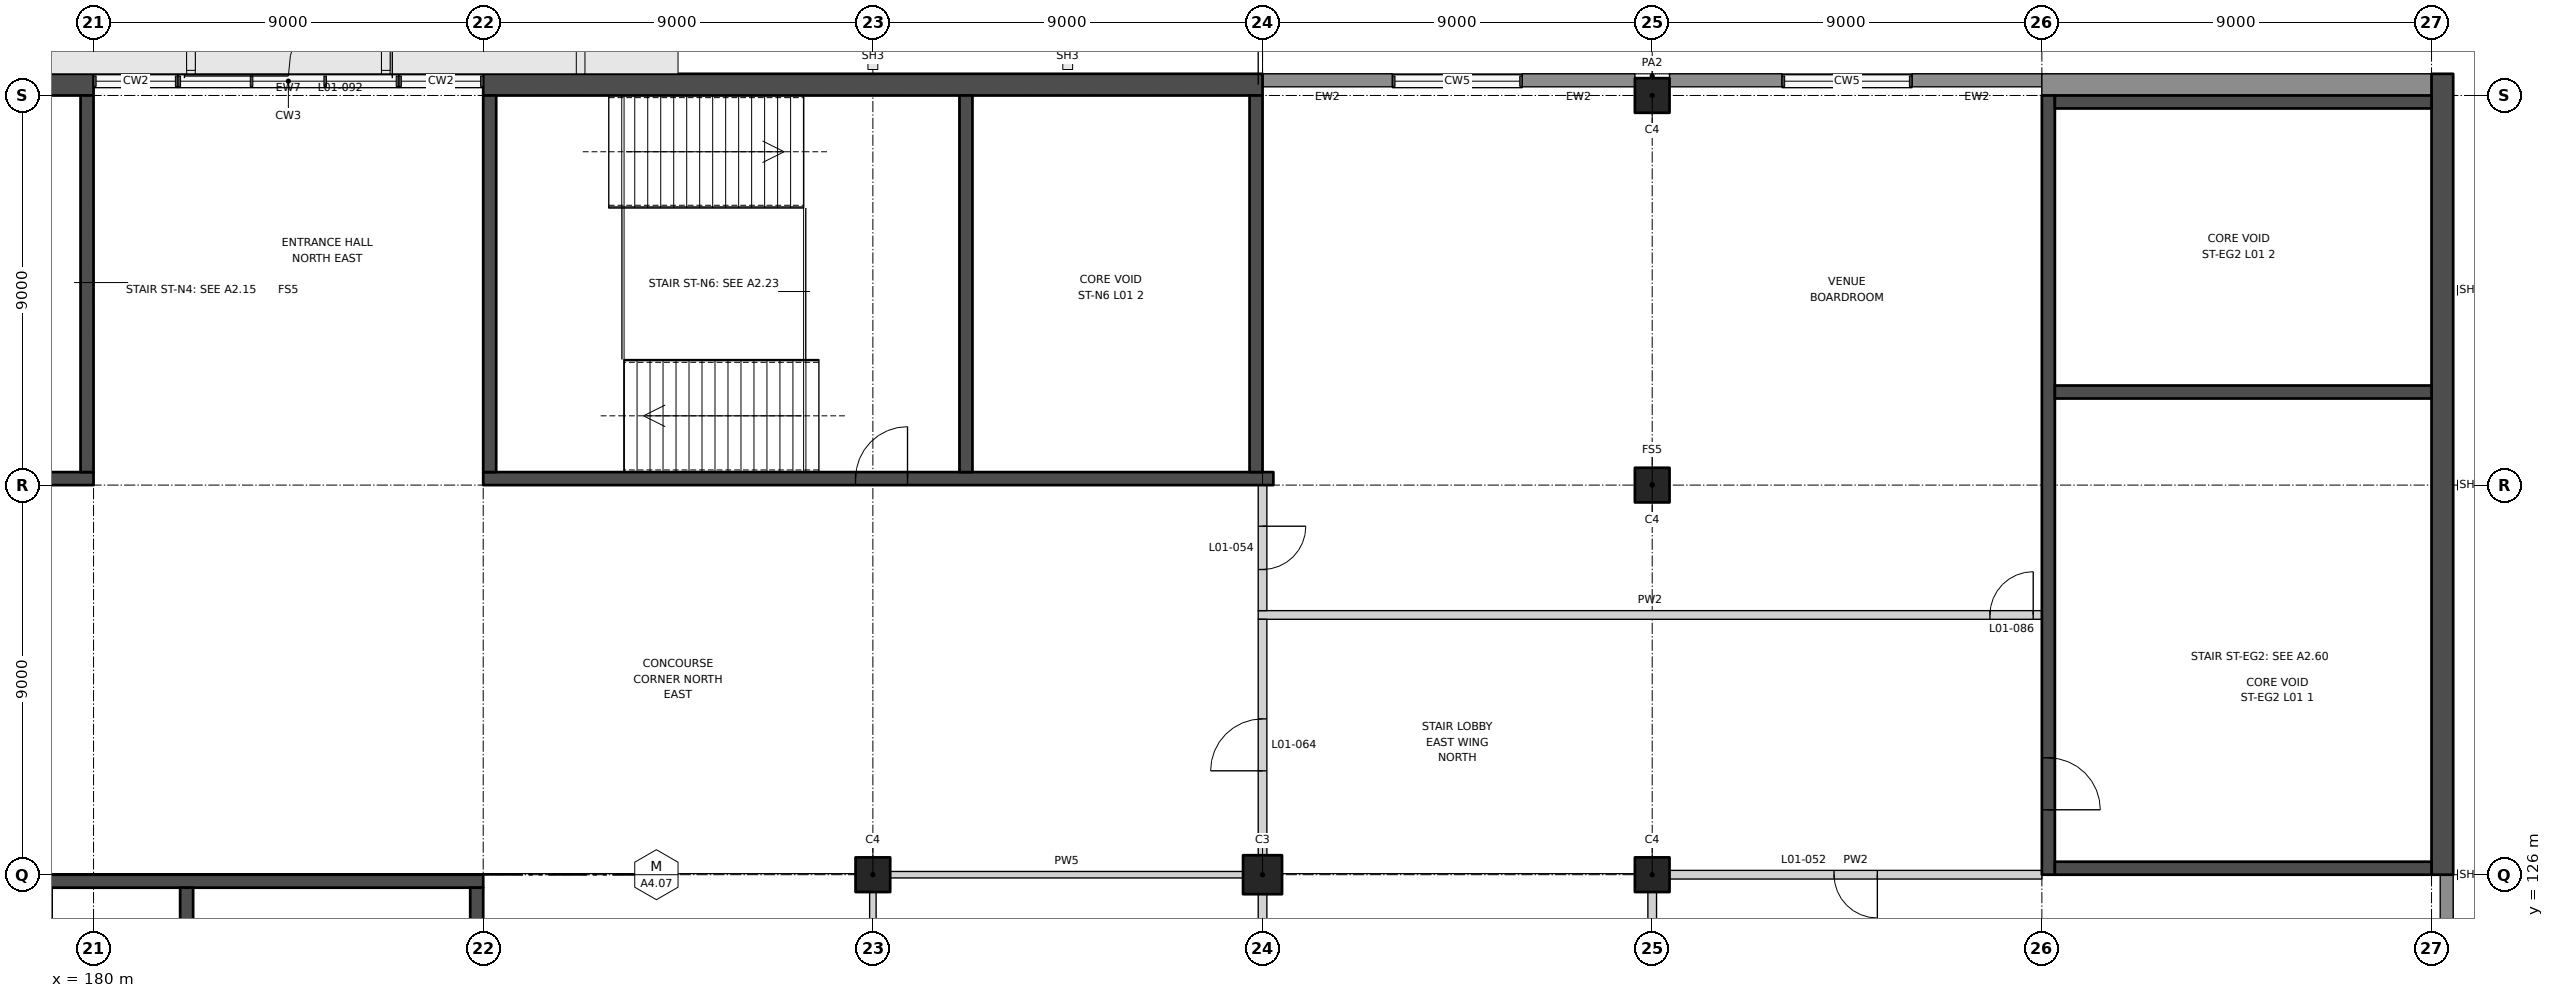
"""IFC4 building model, lengths in metres.
Left out: names, types, materials, properties, quantities, classifications, styles, units other than length and angle.
Written with IfcOpenShell. Run it as: python <this file> out.ifc"""

import sys

from ifc_helpers import new_model, si_unit, direction, frame, frame_2d, origin, origin_2d, place, context, subcontext, project, spatial, rectangle, extrude, element, fill, save


model = new_model("IFC4")
c1 = context("Model", 3, precision=1e-05, world=origin(), true_north=direction((0.0, 1.0)))
c2 = subcontext(c1, "Body", "Model", "MODEL_VIEW")
j1 = project(units=[si_unit("LENGTHUNIT", "METRE"), si_unit("PLANEANGLEUNIT", "RADIAN")], contexts=[c1])
p1 = place(None, origin())
s1 = spatial("IfcSite", under=j1, at=p1, CompositionType="ELEMENT")
p2 = place(p1, origin())
s2 = spatial("IfcBuilding", under=s1, at=p2, CompositionType="ELEMENT")
p3 = place(p2, frame((0.0, 0.0, 7.0)))
s3 = spatial("IfcBuildingStorey", under=s2, at=p3, CompositionType="ELEMENT", Elevation=7.0)
p4 = place(p3, frame((207.0, 126.0, 0.0), z_axis=(0.0, 0.0, 1.0), x_axis=(1.0, 0.0, 0.0)))
e1 = element("IfcColumn", 1, at=p4, inside=s3, PredefinedType="COLUMN", context=c2, shape_type="SweptSolid", body=[
    extrude(rectangle(XDim=0.9, YDim=0.9, at=origin_2d()), origin(), (0.0, 0.0, 1.0), 4.5),
])
for number, where, z_axis, x_axis in (
    (2, (198.0, 126.0, 0.0), (0.0, 0.0, 1.0), (1.0, 0.0, 0.0)),
    (3, (216.0, 126.0, 0.0), (0.0, 0.0, 1.0), (1.0, 0.0, 0.0)),
    (4, (216.0, 135.0, 0.0), (0.0, 0.0, 1.0), (1.0, 0.0, 0.0)),
    (5, (216.0, 144.0, 0.0), (0.0, 0.0, 1.0), (1.0, 0.0, 0.0)),
):
    element("IfcColumn", number, at=place(p3, frame(where, z_axis=z_axis, x_axis=x_axis)), inside=s3, PredefinedType="COLUMN", context=c2, shape_type="SweptSolid", body=[
        extrude(rectangle(XDim=0.8, YDim=0.8, at=origin_2d()), origin(), (0.0, 0.0, 1.0), 4.5),
    ])
p5 = place(p3, frame((198.4, 126.0, 0.0), z_axis=(0.0, 0.0, 1.0), x_axis=(1.0, 0.0, 0.0)))
e6 = element("IfcWall", 6, at=p5, inside=s3, PredefinedType="PARTITIONING", context=c2, shape_type="SweptSolid", body=[
    extrude(rectangle(XDim=8.15, YDim=0.15, at=frame_2d((4.075, 0.0))), origin(), (0.0, 0.0, 1.0), 3.25),
])
p6 = place(p3, frame((216.4, 126.0, 0.0), z_axis=(0.0, 0.0, 1.0), x_axis=(1.0, 0.0, 0.0)))
e7 = element("IfcWall", 7, at=p6, inside=s3, PredefinedType="PARTITIONING", context=c2, shape_type="SweptSolid", body=[
    extrude(rectangle(XDim=8.6, YDim=0.2, at=frame_2d((4.3, 0.0))), origin(), (0.0, 0.0, 1.0), 3.25),
])
p7 = place(p6, frame((3.8, 0.0, 0.0)))
e8 = element("IfcOpeningElement", 8, at=p7, cuts=e7, PredefinedType="OPENING", context=c2, shape_type="SweptSolid", body=[
    extrude(rectangle(XDim=1.0, YDim=2.1, at=frame_2d((0.5, 1.05))), frame((0.0, 0.11, 0.0), z_axis=(0.0, -1.0, 0.0), x_axis=(1.0, 0.0, 0.0)), (0.0, 0.0, 1.0), 0.22),
])
p8 = place(p3, frame((206.9, 132.0, 0.0), z_axis=(0.0, 0.0, 1.0), x_axis=(1.0, 0.0, 0.0)))
e9 = element("IfcWall", 9, at=p8, inside=s3, PredefinedType="PARTITIONING", context=c2, shape_type="SweptSolid", body=[
    extrude(rectangle(XDim=18.1, YDim=0.2, at=frame_2d((9.05, 0.0))), origin(), (0.0, 0.0, 1.0), 4.5),
])
p9 = place(p8, frame((16.9, 0.0, 0.0)))
e10 = element("IfcOpeningElement", 10, at=p9, cuts=e9, PredefinedType="OPENING", context=c2, shape_type="SweptSolid", body=[
    extrude(rectangle(XDim=1.0, YDim=2.1, at=frame_2d((0.5, 1.05))), frame((0.0, 0.11, 0.0), z_axis=(0.0, -1.0, 0.0), x_axis=(1.0, 0.0, 0.0)), (0.0, 0.0, 1.0), 0.22),
])
p10 = place(p3, frame((198.0, 117.4, 0.0), z_axis=(0.0, 0.0, 1.0), x_axis=(0.0, 1.0, 0.0)))
e11 = element("IfcWall", 11, at=p10, inside=s3, PredefinedType="PARTITIONING", context=c2, shape_type="SweptSolid", body=[
    extrude(rectangle(XDim=8.2, YDim=0.15, at=frame_2d((4.1, 0.0))), origin(), (0.0, 0.0, 1.0), 3.25),
])
p11 = place(p10, frame((3.2, 0.0, 0.0)))
e12 = element("IfcOpeningElement", 12, at=p11, cuts=e11, PredefinedType="OPENING", context=c2, shape_type="SweptSolid", body=[
    extrude(rectangle(XDim=1.8, YDim=2.1, at=frame_2d((0.9, 1.05))), frame((0.0, 0.085, 0.0), z_axis=(0.0, -1.0, 0.0), x_axis=(1.0, 0.0, 0.0)), (0.0, 0.0, 1.0), 0.17),
])
p12 = place(p3, frame((207.0, 117.45, 0.0), z_axis=(0.0, 0.0, 1.0), x_axis=(0.0, 1.0, 0.0)))
e13 = element("IfcWall", 13, at=p12, inside=s3, PredefinedType="PARTITIONING", context=c2, shape_type="SweptSolid", body=[
    extrude(rectangle(XDim=8.1, YDim=0.2, at=frame_2d((4.05, 0.0))), origin(), (0.0, 0.0, 1.0), 3.25),
])
p13 = place(p3, frame((207.0, 126.45, 0.0), z_axis=(0.0, 0.0, 1.0), x_axis=(0.0, 1.0, 0.0)))
e14 = element("IfcWall", 14, at=p13, inside=s3, PredefinedType="PARTITIONING", context=c2, shape_type="SweptSolid", body=[
    extrude(rectangle(XDim=5.45, YDim=0.2, at=frame_2d((2.725, 0.0))), origin(), (0.0, 0.0, 1.0), 3.25),
])
p14 = place(p13, frame((1.95, 0.0, 0.0)))
e15 = element("IfcOpeningElement", 15, at=p14, cuts=e14, PredefinedType="OPENING", context=c2, shape_type="SweptSolid", body=[
    extrude(rectangle(XDim=1.2, YDim=2.1, at=frame_2d((0.6, 1.05))), frame((0.0, 0.11, 0.0), z_axis=(0.0, -1.0, 0.0), x_axis=(1.0, 0.0, 0.0)), (0.0, 0.0, 1.0), 0.22),
])
p15 = place(p3, frame((207.0, 132.1, 0.0), z_axis=(0.0, 0.0, 1.0), x_axis=(0.0, 1.0, 0.0)))
e16 = element("IfcWall", 16, at=p15, inside=s3, PredefinedType="PARTITIONING", context=c2, shape_type="SweptSolid", body=[
    extrude(rectangle(XDim=2.9, YDim=0.2, at=frame_2d((1.45, 0.0))), origin(), (0.0, 0.0, 1.0), 3.25),
])
p16 = place(p15, frame((0.95, 0.0, 0.0)))
e17 = element("IfcOpeningElement", 17, at=p16, cuts=e16, PredefinedType="OPENING", context=c2, shape_type="SweptSolid", body=[
    extrude(rectangle(XDim=1.0, YDim=2.1, at=frame_2d((0.5, 1.05))), frame((0.0, 0.11, 0.0), z_axis=(0.0, -1.0, 0.0), x_axis=(1.0, 0.0, 0.0)), (0.0, 0.0, 1.0), 0.22),
])
p17 = place(p3, frame((216.0, 117.4, 0.0), z_axis=(0.0, 0.0, 1.0), x_axis=(0.0, 1.0, 0.0)))
e18 = element("IfcWall", 18, at=p17, inside=s3, PredefinedType="PARTITIONING", context=c2, shape_type="SweptSolid", body=[
    extrude(rectangle(XDim=8.2, YDim=0.2, at=frame_2d((4.1, 0.0))), origin(), (0.0, 0.0, 1.0), 3.25),
])
p18 = place(p3, frame((234.35, 117.4, 0.0), z_axis=(0.0, 0.0, 1.0), x_axis=(0.0, 1.0, 0.0)))
e19 = element("IfcWall", 19, at=p18, inside=s3, PredefinedType="SOLIDWALL", context=c2, shape_type="SweptSolid", body=[
    extrude(rectangle(XDim=8.6, YDim=0.3, at=frame_2d((4.3, 0.0))), origin(), (0.0, 0.0, 1.0), 4.5),
])
p19 = place(p18, frame((2.85, 0.0, 0.9)))
e20 = element("IfcOpeningElement", 20, at=p19, cuts=e19, PredefinedType="OPENING", context=c2, shape_type="SweptSolid", body=[
    extrude(rectangle(XDim=1.0, YDim=2.1, at=frame_2d((0.5, 1.05))), frame((0.0, 0.16, 0.0), z_axis=(0.0, -1.0, 0.0), x_axis=(1.0, 0.0, 0.0)), (0.0, 0.0, 1.0), 0.32),
])
p20 = place(p18, frame((4.35, 0.0, 0.9)))
e21 = element("IfcOpeningElement", 21, at=p20, cuts=e19, PredefinedType="OPENING", context=c2, shape_type="SweptSolid", body=[
    extrude(rectangle(XDim=1.0, YDim=2.1, at=frame_2d((0.5, 1.05))), frame((0.0, 0.16, 0.0), z_axis=(0.0, -1.0, 0.0), x_axis=(1.0, 0.0, 0.0)), (0.0, 0.0, 1.0), 0.32),
])
p21 = place(p3, frame((187.05, 144.45, 0.0), z_axis=(0.0, 0.0, 1.0), x_axis=(-1.0, 0.0, 0.0)))
e22 = element("IfcWall", 22, at=p21, inside=s3, PredefinedType="SOLIDWALL", context=c2, shape_type="SweptSolid", body=[
    extrude(rectangle(XDim=5.1, YDim=0.1, at=frame_2d((2.55, 0.0))), origin(), (0.0, 0.0, 1.0), 3.1),
])
p22 = place(p21, frame((0.15, 0.0, 0.0)))
e23 = element("IfcOpeningElement", 23, at=p22, cuts=e22, PredefinedType="OPENING", context=c2, shape_type="SweptSolid", body=[
    extrude(rectangle(XDim=4.8, YDim=2.7, at=frame_2d((2.4, 1.35))), frame((0.0, 0.06, 0.0), z_axis=(0.0, -1.0, 0.0), x_axis=(1.0, 0.0, 0.0)), (0.0, 0.0, 1.0), 0.12),
])
p23 = place(p3, frame((210.0, 144.35, 0.0), z_axis=(0.0, 0.0, 1.0), x_axis=(-1.0, 0.0, 0.0)))
e24 = element("IfcWall", 24, at=p23, inside=s3, PredefinedType="SOLIDWALL", context=c2, shape_type="SweptSolid", body=[
    extrude(rectangle(XDim=3.0, YDim=0.3, at=frame_2d((1.5, 0.0))), origin(), (0.0, 0.0, 1.0), 3.9),
])
for number, where, z_axis, x_axis in (
    (25, (215.6, 144.35, 0.0), (0.0, 0.0, 1.0), (-1.0, 0.0, 0.0)),
    (26, (219.0, 144.35, 0.0), (0.0, 0.0, 1.0), (-1.0, 0.0, 0.0)),
):
    element("IfcWall", number, at=place(p3, frame(where, z_axis=z_axis, x_axis=x_axis)), inside=s3, PredefinedType="SOLIDWALL", context=c2, shape_type="SweptSolid", body=[
        extrude(rectangle(XDim=2.6, YDim=0.3, at=frame_2d((1.3, 0.0))), origin(), (0.0, 0.0, 1.0), 3.9),
    ])
p24 = place(p3, frame((225.0, 144.35, 0.0), z_axis=(0.0, 0.0, 1.0), x_axis=(-1.0, 0.0, 0.0)))
e27 = element("IfcWall", 27, at=p24, inside=s3, PredefinedType="SOLIDWALL", context=c2, shape_type="SweptSolid", body=[
    extrude(rectangle(XDim=3.0, YDim=0.3, at=frame_2d((1.5, 0.0))), origin(), (0.0, 0.0, 1.0), 3.9),
])
p25 = place(p3, frame((234.0, 144.25, 0.0), z_axis=(0.0, 0.0, 1.0), x_axis=(-1.0, 0.0, 0.0)))
e28 = element("IfcWall", 28, at=p25, inside=s3, PredefinedType="SOLIDWALL", context=c2, shape_type="SweptSolid", body=[
    extrude(rectangle(XDim=9.0, YDim=0.5, at=frame_2d((4.5, 0.0))), origin(), (0.0, 0.0, 1.0), 4.5),
])
p26 = place(p3, frame((180.0, 135.15, 0.0), z_axis=(0.0, 0.0, 1.0), x_axis=(-1.0, 0.0, 0.0)))
e29 = element("IfcWall", 29, at=p26, inside=s3, PredefinedType="SHEAR", context=c2, shape_type="SweptSolid", body=[
    extrude(rectangle(XDim=18.0, YDim=0.3, at=frame_2d((9.0, 0.0))), origin(), (0.0, 0.0, 1.0), 4.5),
])
p27 = place(p26, frame((8.6, 0.0, 0.0)))
e30 = element("IfcOpeningElement", 30, at=p27, cuts=e29, PredefinedType="OPENING", context=c2, shape_type="SweptSolid", body=[
    extrude(rectangle(XDim=1.2, YDim=2.1, at=frame_2d((0.6, 1.05))), frame((0.0, 0.16, 0.0), z_axis=(0.0, -1.0, 0.0), x_axis=(1.0, 0.0, 0.0)), (0.0, 0.0, 1.0), 0.32),
])
p28 = place(p3, frame((180.0, 144.25, 0.0), z_axis=(0.0, 0.0, 1.0), x_axis=(-1.0, 0.0, 0.0)))
e31 = element("IfcWall", 31, at=p28, inside=s3, PredefinedType="SHEAR", context=c2, shape_type="SweptSolid", body=[
    extrude(rectangle(XDim=18.0, YDim=0.5, at=frame_2d((9.0, 0.0))), origin(), (0.0, 0.0, 1.0), 4.5),
])
p29 = place(p3, frame((179.85, 135.3, 0.0), z_axis=(0.0, 0.0, 1.0), x_axis=(0.0, 1.0, 0.0)))
e32 = element("IfcWall", 32, at=p29, inside=s3, PredefinedType="SHEAR", context=c2, shape_type="SweptSolid", body=[
    extrude(rectangle(XDim=8.7, YDim=0.3, at=frame_2d((4.35, 0.0))), origin(), (0.0, 0.0, 1.0), 4.5),
])
p30 = place(p3, frame((189.0, 135.15, 0.0), z_axis=(0.0, 0.0, 1.0), x_axis=(1.0, 0.0, 0.0)))
e33 = element("IfcWall", 33, at=p30, inside=s3, PredefinedType="SHEAR", context=c2, shape_type="SweptSolid", body=[
    extrude(rectangle(XDim=18.25, YDim=0.3, at=frame_2d((9.125, 0.0))), origin(), (0.0, 0.0, 1.0), 4.5),
])
p31 = place(p30, frame((8.6, 0.0, 0.0)))
e34 = element("IfcOpeningElement", 34, at=p31, cuts=e33, PredefinedType="OPENING", context=c2, shape_type="SweptSolid", body=[
    extrude(rectangle(XDim=1.2, YDim=2.1, at=frame_2d((0.6, 1.05))), frame((0.0, 0.16, 0.0), z_axis=(0.0, -1.0, 0.0), x_axis=(1.0, 0.0, 0.0)), (0.0, 0.0, 1.0), 0.32),
])
p32 = place(p3, frame((189.0, 144.25, 0.0), z_axis=(0.0, 0.0, 1.0), x_axis=(1.0, 0.0, 0.0)))
e35 = element("IfcWall", 35, at=p32, inside=s3, PredefinedType="SHEAR", context=c2, shape_type="SweptSolid", body=[
    extrude(rectangle(XDim=18.0, YDim=0.5, at=frame_2d((9.0, 0.0))), origin(), (0.0, 0.0, 1.0), 4.5),
])
for number, where, z_axis, x_axis in (
    (36, (189.15, 135.3, 0.0), (0.0, 0.0, 1.0), (0.0, 1.0, 0.0)),
    (37, (206.85, 135.3, 0.0), (0.0, 0.0, 1.0), (0.0, 1.0, 0.0)),
    (38, (200.15, 135.3, 0.0), (0.0, 0.0, 1.0), (0.0, 1.0, 0.0)),
):
    element("IfcWall", number, at=place(p3, frame(where, z_axis=z_axis, x_axis=x_axis)), inside=s3, PredefinedType="SHEAR", context=c2, shape_type="SweptSolid", body=[
        extrude(rectangle(XDim=8.7, YDim=0.3, at=frame_2d((4.35, 0.0))), origin(), (0.0, 0.0, 1.0), 4.5),
    ])
p33 = place(p3, frame((171.0, 125.85, 0.0), z_axis=(0.0, 0.0, 1.0), x_axis=(1.0, 0.0, 0.0)))
e39 = element("IfcWall", 39, at=p33, inside=s3, PredefinedType="SHEAR", context=c2, shape_type="SweptSolid", body=[
    extrude(rectangle(XDim=18.0, YDim=0.3, at=frame_2d((9.0, 0.0))), origin(), (0.0, 0.0, 1.0), 4.5),
])
for number, where, z_axis, x_axis in (
    (40, (188.85, 117.3, 0.0), (0.0, 0.0, 1.0), (0.0, 1.0, 0.0)),
    (41, (182.15, 117.3, 0.0), (0.0, 0.0, 1.0), (0.0, 1.0, 0.0)),
):
    element("IfcWall", number, at=place(p3, frame(where, z_axis=z_axis, x_axis=x_axis)), inside=s3, PredefinedType="SHEAR", context=c2, shape_type="SweptSolid", body=[
        extrude(rectangle(XDim=8.4, YDim=0.3, at=frame_2d((4.2, 0.0))), origin(), (0.0, 0.0, 1.0), 4.5),
    ])
p34 = place(p3, frame((225.15, 126.0, 0.0), z_axis=(0.0, 0.0, 1.0), x_axis=(0.0, 1.0, 0.0)))
e42 = element("IfcWall", 42, at=p34, inside=s3, PredefinedType="SHEAR", context=c2, shape_type="SweptSolid", body=[
    extrude(rectangle(XDim=18.0, YDim=0.3, at=frame_2d((9.0, 0.0))), origin(), (0.0, 0.0, 1.0), 4.5),
])
p35 = place(p34, frame((1.5, 0.0, 0.0)))
e43 = element("IfcOpeningElement", 43, at=p35, cuts=e42, PredefinedType="OPENING", context=c2, shape_type="SweptSolid", body=[
    extrude(rectangle(XDim=1.2, YDim=2.1, at=frame_2d((0.6, 1.05))), frame((0.0, 0.16, 0.0), z_axis=(0.0, -1.0, 0.0), x_axis=(1.0, 0.0, 0.0)), (0.0, 0.0, 1.0), 0.32),
])
p36 = place(p3, frame((234.25, 126.0, 0.0), z_axis=(0.0, 0.0, 1.0), x_axis=(0.0, 1.0, 0.0)))
e44 = element("IfcWall", 44, at=p36, inside=s3, PredefinedType="SHEAR", context=c2, shape_type="SweptSolid", body=[
    extrude(rectangle(XDim=18.5, YDim=0.5, at=frame_2d((9.25, 0.0))), origin(), (0.0, 0.0, 1.0), 4.5),
])
for number, where, z_axis, x_axis in (
    (45, (225.3, 126.15, 0.0), (0.0, 0.0, 1.0), (1.0, 0.0, 0.0)),
    (46, (225.3, 143.85, 0.0), (0.0, 0.0, 1.0), (1.0, 0.0, 0.0)),
    (47, (225.3, 137.15, 0.0), (0.0, 0.0, 1.0), (1.0, 0.0, 0.0)),
):
    element("IfcWall", number, at=place(p3, frame(where, z_axis=z_axis, x_axis=x_axis)), inside=s3, PredefinedType="SHEAR", context=c2, shape_type="SweptSolid", body=[
        extrude(rectangle(XDim=8.7, YDim=0.3, at=frame_2d((4.35, 0.0))), origin(), (0.0, 0.0, 1.0), 4.5),
    ])
p37 = place(p7, frame((1.0, 0.0, 0.0), z_axis=(0.0, 0.0, 1.0), x_axis=(-1.0, 0.0, 0.0)))
e48 = element("IfcDoor", 48, at=p37, inside=s3, OperationType="SINGLE_SWING_LEFT", PredefinedType="DOOR", context=c2, shape_type="SweptSolid", body=[
    extrude(rectangle(XDim=1.0, YDim=2.1, at=frame_2d((0.5, 1.05))), frame((0.0, 0.025, 0.0), z_axis=(0.0, -1.0, 0.0), x_axis=(1.0, 0.0, 0.0)), (0.0, 0.0, 1.0), 0.05),
])
fill(e8, e48)
p38 = place(p16, frame((1.0, 0.0, 0.0), z_axis=(0.0, 0.0, 1.0), x_axis=(-1.0, 0.0, 0.0)))
e49 = element("IfcDoor", 49, at=p38, inside=s3, OperationType="SINGLE_SWING_LEFT", PredefinedType="DOOR", context=c2, shape_type="SweptSolid", body=[
    extrude(rectangle(XDim=1.0, YDim=2.1, at=frame_2d((0.5, 1.05))), frame((0.0, 0.025, 0.0), z_axis=(0.0, -1.0, 0.0), x_axis=(1.0, 0.0, 0.0)), (0.0, 0.0, 1.0), 0.05),
])
fill(e17, e49)
p39 = place(p14, origin())
e50 = element("IfcDoor", 50, at=p39, inside=s3, OperationType="SINGLE_SWING_LEFT", PredefinedType="DOOR", context=c2, shape_type="SweptSolid", body=[
    extrude(rectangle(XDim=1.2, YDim=2.1, at=frame_2d((0.6, 1.05))), frame((0.0, 0.025, 0.0), z_axis=(0.0, -1.0, 0.0), x_axis=(1.0, 0.0, 0.0)), (0.0, 0.0, 1.0), 0.05),
])
fill(e15, e50)
p40 = place(p9, origin())
e51 = element("IfcDoor", 51, at=p40, inside=s3, OperationType="SINGLE_SWING_RIGHT", PredefinedType="DOOR", context=c2, shape_type="SweptSolid", body=[
    extrude(rectangle(XDim=1.0, YDim=2.1, at=frame_2d((0.5, 1.05))), frame((0.0, 0.025, 0.0), z_axis=(0.0, -1.0, 0.0), x_axis=(1.0, 0.0, 0.0)), (0.0, 0.0, 1.0), 0.05),
])
fill(e10, e51)
p41 = place(p22, frame((4.8, 0.0, 0.0), z_axis=(0.0, 0.0, 1.0), x_axis=(-1.0, 0.0, 0.0)))
e52 = element("IfcDoor", 52, at=p41, inside=s3, OperationType="DOUBLE_DOOR_SINGLE_SWING", PredefinedType="DOOR", context=c2, shape_type="SweptSolid", body=[
    extrude(rectangle(XDim=4.8, YDim=2.7, at=frame_2d((2.4, 1.35))), frame((0.0, 0.025, 0.0), z_axis=(0.0, -1.0, 0.0), x_axis=(1.0, 0.0, 0.0)), (0.0, 0.0, 1.0), 0.05),
])
fill(e23, e52)
p42 = place(p31, origin())
e53 = element("IfcDoor", 53, at=p42, inside=s3, OperationType="SINGLE_SWING_RIGHT", PredefinedType="DOOR", context=c2, shape_type="SweptSolid", body=[
    extrude(rectangle(XDim=1.2, YDim=2.1, at=frame_2d((0.6, 1.05))), frame((0.0, 0.025, 0.0), z_axis=(0.0, -1.0, 0.0), x_axis=(1.0, 0.0, 0.0)), (0.0, 0.0, 1.0), 0.05),
])
fill(e34, e53)
p43 = place(p35, frame((1.2, 0.0, 0.0), z_axis=(0.0, 0.0, 1.0), x_axis=(-1.0, 0.0, 0.0)))
e54 = element("IfcDoor", 54, at=p43, inside=s3, OperationType="SINGLE_SWING_RIGHT", PredefinedType="DOOR", context=c2, shape_type="SweptSolid", body=[
    extrude(rectangle(XDim=1.2, YDim=2.1, at=frame_2d((0.6, 1.05))), frame((0.0, 0.025, 0.0), z_axis=(0.0, -1.0, 0.0), x_axis=(1.0, 0.0, 0.0)), (0.0, 0.0, 1.0), 0.05),
])
fill(e43, e54)
save(model, sys.argv[1])
